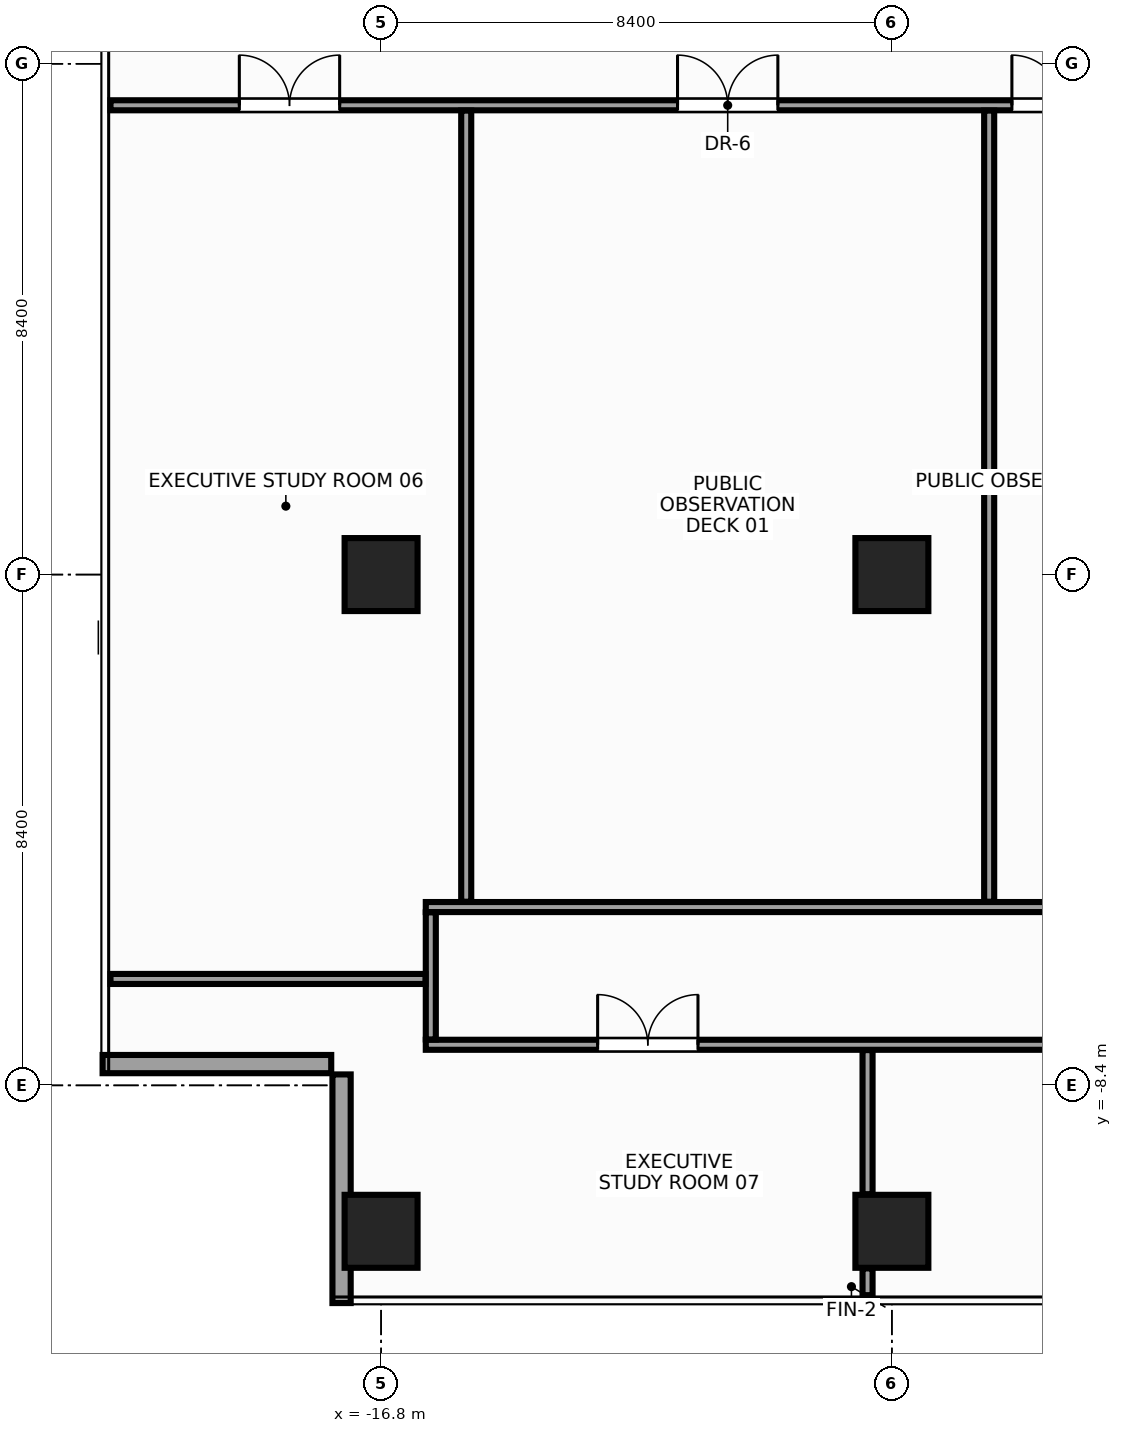
"""IFC4 building model, lengths in metres.
Left out: names, types, materials, properties, quantities, classifications, styles, units other than length and angle.
Written with IfcOpenShell. Run it as: python <this file> out.ifc"""

import sys

from ifc_helpers import new_model, si_unit, direction, frame, frame_2d, origin, origin_2d, place, context, subcontext, project, spatial, rectangle, extrude, source, transform, mapped, element, fill, save


model = new_model("IFC4")
c1 = context("Model", 3, precision=1e-05, world=origin(), true_north=direction((0.0, 1.0)))
c2 = subcontext(c1, "Body", "Model", "MODEL_VIEW")
j1 = project(units=[si_unit("LENGTHUNIT", "METRE"), si_unit("PLANEANGLEUNIT", "RADIAN")], contexts=[c1])
p1 = place(None, origin())
s1 = spatial("IfcSite", under=j1, at=p1, CompositionType="ELEMENT")
p2 = place(p1, origin())
s2 = spatial("IfcBuilding", under=s1, at=p2, CompositionType="ELEMENT")
p3 = place(p2, frame((0.0, 0.0, 286.4)))
s3 = spatial("IfcBuildingStorey", under=s2, at=p3, CompositionType="ELEMENT", Elevation=286.4)
m1 = source(origin(), c2, "Body", "SweptSolid", [
    extrude(rectangle(XDim=1.2, YDim=1.2, at=origin_2d()), origin(), (0.0, 0.0, 1.0), 3.6),
])
for number, where, z_axis, x_axis in (
    (1, (-16.8, -10.8, 0.0), (0.0, 0.0, 1.0), (1.0, 0.0, 0.0)),
    (2, (-16.8, 0.0, 0.0), (0.0, 0.0, 1.0), (1.0, 0.0, 0.0)),
    (3, (-8.4, 0.0, 0.0), (0.0, 0.0, 1.0), (1.0, 0.0, 0.0)),
    (4, (-8.4, -10.8, 0.0), (0.0, 0.0, 1.0), (1.0, 0.0, 0.0)),
):
    element("IfcColumn", number, at=place(p3, frame(where, z_axis=z_axis, x_axis=x_axis)), inside=s3, PredefinedType="COLUMN", context=c2, shape_type="MappedRepresentation", body=[
        mapped(m1, transform((0.0, 0.0, 0.0), x_axis=(1.0, 0.0, 0.0), y_axis=(0.0, 1.0, 0.0), z_axis=(0.0, 0.0, 1.0), scale=1.0)),
    ])
m2 = source(origin(), c2, "Body", "SweptSolid", [
    extrude(rectangle(XDim=3.76, YDim=0.3, at=frame_2d((1.88, 0.0))), origin(), (0.0, 0.0, 1.0), 2.75),
])
p4 = place(p3, frame((-21.38, -8.05, 0.0), z_axis=(0.0, 0.0, 1.0), x_axis=(1.0, 0.0, 0.0)))
e5 = element("IfcWall", 5, at=p4, inside=s3, PredefinedType="STANDARD", context=c2, shape_type="MappedRepresentation", body=[
    mapped(m2, transform((0.0, 0.0, 0.0), x_axis=(1.0, 0.0, 0.0), y_axis=(0.0, 1.0, 0.0), z_axis=(0.0, 0.0, 1.0), scale=1.0)),
])
m3 = source(origin(), c2, "Body", "SweptSolid", [
    extrude(rectangle(XDim=3.76, YDim=0.3, at=frame_2d((1.88, 0.0))), origin(), (0.0, 0.0, 1.0), 2.75),
])
p5 = place(p3, frame((-17.45, -8.22, 0.0), z_axis=(0.0, 0.0, 1.0), x_axis=(0.0, -1.0, 0.0)))
e6 = element("IfcWall", 6, at=p5, inside=s3, PredefinedType="STANDARD", context=c2, shape_type="MappedRepresentation", body=[
    mapped(m3, transform((0.0, 0.0, 0.0), x_axis=(1.0, 0.0, 0.0), y_axis=(0.0, 1.0, 0.0), z_axis=(0.0, 0.0, 1.0), scale=1.0)),
])
m4 = source(origin(), c2, "Body", "SweptSolid", [
    extrude(rectangle(XDim=16.885, YDim=0.165, at=frame_2d((8.442, 0.0))), origin(), (0.0, 0.0, 1.0), 2.755),
])
p6 = place(p3, frame((-21.25, 7.718, 0.0), z_axis=(0.0, 0.0, 1.0), x_axis=(1.0, 0.0, 0.0)))
e7 = element("IfcWall", 7, at=p6, inside=s3, PredefinedType="PARTITIONING", context=c2, shape_type="MappedRepresentation", body=[
    mapped(m4, transform((0.0, 0.0, 0.0), x_axis=(1.0, 0.0, 0.0), y_axis=(0.0, 1.0, 0.0), z_axis=(0.0, 0.0, 1.0), scale=1.0)),
])
p7 = place(p6, frame((9.325, 0.0, 0.0)))
e8 = element("IfcOpeningElement", 8, at=p7, cuts=e7, PredefinedType="OPENING", context=c2, shape_type="SweptSolid", body=[
    extrude(rectangle(XDim=1.65, YDim=2.35, at=frame_2d((0.825, 1.175))), frame((0.0, 0.094, 0.0), z_axis=(0.0, -1.0, 0.0), x_axis=(1.0, 0.0, 0.0)), (0.0, 0.0, 1.0), 0.189),
])
p8 = place(p6, frame((14.824, 0.0, 0.0)))
e9 = element("IfcOpeningElement", 9, at=p8, cuts=e7, PredefinedType="OPENING", context=c2, shape_type="SweptSolid", body=[
    extrude(rectangle(XDim=1.65, YDim=2.35, at=frame_2d((0.825, 1.175))), frame((0.0, 0.094, 0.0), z_axis=(0.0, -1.0, 0.0), x_axis=(1.0, 0.0, 0.0)), (0.0, 0.0, 1.0), 0.189),
])
p9 = place(p6, frame((2.119, 0.0, 0.0)))
e10 = element("IfcOpeningElement", 10, at=p9, cuts=e7, PredefinedType="OPENING", context=c2, shape_type="SweptSolid", body=[
    extrude(rectangle(XDim=1.65, YDim=2.35, at=frame_2d((0.825, 1.175))), frame((0.0, 0.094, 0.0), z_axis=(0.0, -1.0, 0.0), x_axis=(1.0, 0.0, 0.0)), (0.0, 0.0, 1.0), 0.189),
])
m5 = source(origin(), c2, "Body", "SweptSolid", [
    extrude(rectangle(XDim=11.7, YDim=0.165, at=frame_2d((5.85, 0.0))), origin(), (0.0, 0.0, 1.0), 2.755),
])
p10 = place(p3, frame((-16.065, -5.468, 0.0), z_axis=(0.0, 0.0, 1.0), x_axis=(1.0, 0.0, 0.0)))
e11 = element("IfcWall", 11, at=p10, inside=s3, PredefinedType="PARTITIONING", context=c2, shape_type="MappedRepresentation", body=[
    mapped(m5, transform((0.0, 0.0, 0.0), x_axis=(1.0, 0.0, 0.0), y_axis=(0.0, 1.0, 0.0), z_axis=(0.0, 0.0, 1.0), scale=1.0)),
])
m6 = source(origin(), c2, "Body", "SweptSolid", [
    extrude(rectangle(XDim=32.13, YDim=0.165, at=frame_2d((16.065, 0.0))), origin(), (0.0, 0.0, 1.0), 2.755),
])
p11 = place(p3, frame((-16.065, -7.732, 0.0), z_axis=(0.0, 0.0, 1.0), x_axis=(1.0, 0.0, 0.0)))
e12 = element("IfcWall", 12, at=p11, inside=s3, PredefinedType="PARTITIONING", context=c2, shape_type="MappedRepresentation", body=[
    mapped(m6, transform((0.0, 0.0, 0.0), x_axis=(1.0, 0.0, 0.0), y_axis=(0.0, 1.0, 0.0), z_axis=(0.0, 0.0, 1.0), scale=1.0)),
])
p12 = place(p11, frame((2.826, 0.0, 0.0)))
e13 = element("IfcOpeningElement", 13, at=p12, cuts=e12, PredefinedType="OPENING", context=c2, shape_type="SweptSolid", body=[
    extrude(rectangle(XDim=1.65, YDim=2.35, at=frame_2d((0.825, 1.175))), frame((0.0, 0.094, 0.0), z_axis=(0.0, -1.0, 0.0), x_axis=(1.0, 0.0, 0.0)), (0.0, 0.0, 1.0), 0.189),
])
p13 = place(p11, frame((23.074, 0.0, 0.0)))
e14 = element("IfcOpeningElement", 14, at=p13, cuts=e12, PredefinedType="OPENING", context=c2, shape_type="SweptSolid", body=[
    extrude(rectangle(XDim=1.65, YDim=2.35, at=frame_2d((0.825, 1.175))), frame((0.0, 0.094, 0.0), z_axis=(0.0, -1.0, 0.0), x_axis=(1.0, 0.0, 0.0)), (0.0, 0.0, 1.0), 0.189),
])
p14 = place(p11, frame((14.4, 0.0, 0.0)))
e15 = element("IfcOpeningElement", 15, at=p14, cuts=e12, PredefinedType="OPENING", context=c2, shape_type="SweptSolid", body=[
    extrude(rectangle(XDim=1.65, YDim=2.35, at=frame_2d((0.825, 1.175))), frame((0.0, 0.094, 0.0), z_axis=(0.0, -1.0, 0.0), x_axis=(1.0, 0.0, 0.0)), (0.0, 0.0, 1.0), 0.189),
])
m7 = source(origin(), c2, "Body", "SweptSolid", [
    extrude(rectangle(XDim=2.09, YDim=0.165, at=frame_2d((1.045, 0.0))), origin(), (0.0, 0.0, 1.0), 3.37),
])
p15 = place(p3, frame((-15.982, -7.645, 0.0), z_axis=(0.0, 0.0, 1.0), x_axis=(0.0, 1.0, 0.0)))
e16 = element("IfcWall", 16, at=p15, inside=s3, PredefinedType="PARTITIONING", context=c2, shape_type="MappedRepresentation", body=[
    mapped(m7, transform((0.0, 0.0, 0.0), x_axis=(1.0, 0.0, 0.0), y_axis=(0.0, 1.0, 0.0), z_axis=(0.0, 0.0, 1.0), scale=1.0)),
])
m8 = source(origin(), c2, "Body", "SweptSolid", [
    extrude(rectangle(XDim=5.18, YDim=0.165, at=frame_2d((2.59, 0.0))), origin(), (0.0, 0.0, 1.0), 2.755),
])
p16 = place(p3, frame((-21.25, -6.65, 0.0), z_axis=(0.0, 0.0, 1.0), x_axis=(1.0, 0.0, 0.0)))
e17 = element("IfcWall", 17, at=p16, inside=s3, PredefinedType="PARTITIONING", context=c2, shape_type="MappedRepresentation", body=[
    mapped(m8, transform((0.0, 0.0, 0.0), x_axis=(1.0, 0.0, 0.0), y_axis=(0.0, 1.0, 0.0), z_axis=(0.0, 0.0, 1.0), scale=1.0)),
])
m9 = source(origin(), c2, "Body", "SweptSolid", [
    extrude(rectangle(XDim=13.01, YDim=0.165, at=frame_2d((6.505, 0.0))), origin(), (0.0, 0.0, 1.0), 2.655),
])
for number, where, z_axis, x_axis in (
    (18, (-15.4, -5.38, 0.0), (0.0, 0.0, 1.0), (0.0, 1.0, 0.0)),
    (19, (-6.8, -5.38, 0.0), (0.0, 0.0, 1.0), (0.0, 1.0, 0.0)),
):
    element("IfcWall", number, at=place(p3, frame(where, z_axis=z_axis, x_axis=x_axis)), inside=s3, PredefinedType="PARTITIONING", context=c2, shape_type="MappedRepresentation", body=[
        mapped(m9, transform((0.0, 0.0, 0.0), x_axis=(1.0, 0.0, 0.0), y_axis=(0.0, 1.0, 0.0), z_axis=(0.0, 0.0, 1.0), scale=1.0)),
    ])
m10 = source(origin(), c2, "Body", "SweptSolid", [
    extrude(rectangle(XDim=0.44, YDim=0.165, at=frame_2d((0.22, 0.0))), origin(), (0.0, 0.0, 1.0), 3.37),
])
p17 = place(p3, frame((-8.8, -11.85, 0.0), z_axis=(0.0, 0.0, 1.0), x_axis=(0.0, 1.0, 0.0)))
e20 = element("IfcWall", 20, at=p17, inside=s3, PredefinedType="PARTITIONING", context=c2, shape_type="MappedRepresentation", body=[
    mapped(m10, transform((0.0, 0.0, 0.0), x_axis=(1.0, 0.0, 0.0), y_axis=(0.0, 1.0, 0.0), z_axis=(0.0, 0.0, 1.0), scale=1.0)),
])
m11 = source(origin(), c2, "Body", "SweptSolid", [
    extrude(rectangle(XDim=2.37, YDim=0.165, at=frame_2d((1.185, 0.0))), origin(), (0.0, 0.0, 1.0), 3.37),
])
p18 = place(p3, frame((-8.8, -10.19, 0.0), z_axis=(0.0, 0.0, 1.0), x_axis=(0.0, 1.0, 0.0)))
e21 = element("IfcWall", 21, at=p18, inside=s3, PredefinedType="PARTITIONING", context=c2, shape_type="MappedRepresentation", body=[
    mapped(m11, transform((0.0, 0.0, 0.0), x_axis=(1.0, 0.0, 0.0), y_axis=(0.0, 1.0, 0.0), z_axis=(0.0, 0.0, 1.0), scale=1.0)),
])
m12 = source(origin(), c2, "Body", "SweptSolid", [
    extrude(rectangle(XDim=1.65, YDim=2.35, at=frame_2d((0.825, 1.175))), frame((0.0, 0.025, 0.0), z_axis=(0.0, -1.0, 0.0), x_axis=(1.0, 0.0, 0.0)), (0.0, 0.0, 1.0), 0.05),
])
p19 = place(p7, origin())
e22 = element("IfcDoor", 22, at=p19, inside=s3, OperationType="DOUBLE_DOOR_SINGLE_SWING", PredefinedType="DOOR", context=c2, shape_type="MappedRepresentation", body=[
    mapped(m12, transform((0.0, 0.0, 0.0), x_axis=(1.0, 0.0, 0.0), y_axis=(0.0, 1.0, 0.0), z_axis=(0.0, 0.0, 1.0), scale=1.0)),
])
fill(e8, e22)
p20 = place(p8, origin())
e23 = element("IfcDoor", 23, at=p20, inside=s3, OperationType="DOUBLE_DOOR_SINGLE_SWING", PredefinedType="DOOR", context=c2, shape_type="MappedRepresentation", body=[
    mapped(m12, transform((0.0, 0.0, 0.0), x_axis=(1.0, 0.0, 0.0), y_axis=(0.0, 1.0, 0.0), z_axis=(0.0, 0.0, 1.0), scale=1.0)),
])
fill(e9, e23)
p21 = place(p9, origin())
e24 = element("IfcDoor", 24, at=p21, inside=s3, OperationType="DOUBLE_DOOR_SINGLE_SWING", PredefinedType="DOOR", context=c2, shape_type="MappedRepresentation", body=[
    mapped(m12, transform((0.0, 0.0, 0.0), x_axis=(1.0, 0.0, 0.0), y_axis=(0.0, 1.0, 0.0), z_axis=(0.0, 0.0, 1.0), scale=1.0)),
])
fill(e10, e24)
p22 = place(p12, origin())
e25 = element("IfcDoor", 25, at=p22, inside=s3, OperationType="DOUBLE_DOOR_SINGLE_SWING", PredefinedType="DOOR", context=c2, shape_type="MappedRepresentation", body=[
    mapped(m12, transform((0.0, 0.0, 0.0), x_axis=(1.0, 0.0, 0.0), y_axis=(0.0, 1.0, 0.0), z_axis=(0.0, 0.0, 1.0), scale=1.0)),
])
fill(e13, e25)
save(model, sys.argv[1])
